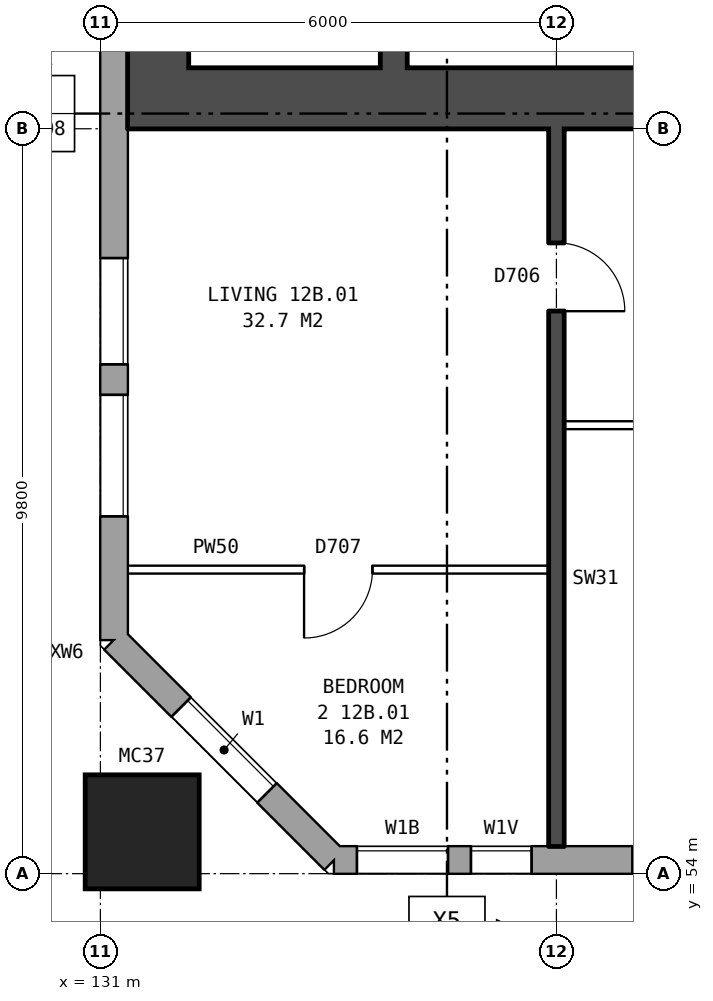
"""IFC4 building model, lengths in metres.
Left out: names, types, materials, properties, quantities, classifications, styles, units other than length and angle.
Written with IfcOpenShell. Run it as: python <this file> out.ifc"""

import sys

from ifc_helpers import new_model, si_unit, direction, frame, frame_2d, origin, origin_2d, place, context, subcontext, project, spatial, rectangle, hollow_rectangle, extrude, element, fill, save


model = new_model("IFC4")
c1 = context("Model", 3, precision=1e-05, world=origin(), true_north=direction((0.0, 1.0)))
c2 = subcontext(c1, "Body", "Model", "MODEL_VIEW")
j1 = project(units=[si_unit("LENGTHUNIT", "METRE"), si_unit("PLANEANGLEUNIT", "RADIAN")], contexts=[c1])
p1 = place(None, origin())
s1 = spatial("IfcSite", under=j1, at=p1, CompositionType="ELEMENT")
p2 = place(p1, origin())
s2 = spatial("IfcBuilding", under=s1, at=p2, CompositionType="ELEMENT")
p3 = place(p2, frame((0.0, 0.0, 47.4)))
s3 = spatial("IfcBuildingStorey", under=s2, at=p3, CompositionType="ELEMENT", Elevation=47.4)
p4 = place(p3, frame((131.55, 54.55, 0.0), z_axis=(0.0, 0.0, 1.0), x_axis=(1.0, 0.0, 0.0)))
e1 = element("IfcColumn", 1, at=p4, inside=s3, PredefinedType="COLUMN", context=c2, shape_type="SweptSolid", body=[
    extrude(hollow_rectangle(XDim=1.5, YDim=1.5, WallThickness=0.08, at=origin_2d()), origin(), (0.0, 0.0, 1.0), 3.1),
])
p5 = place(p3, frame((131.18, 57.075, 0.0), z_axis=(0.0, 0.0, 1.0), x_axis=(0.707106781187, -0.707106781187, 0.0)))
e2 = element("IfcWall", 2, at=p5, inside=s3, PredefinedType="STANDARD", context=c2, shape_type="SweptSolid", body=[
    extrude(rectangle(XDim=4.094, YDim=0.36, at=frame_2d((2.047, 0.0))), origin(), (0.0, 0.0, 1.0), 2.85),
])
p6 = place(p5, frame((1.247, 0.0, 0.8)))
e3 = element("IfcOpeningElement", 3, at=p6, cuts=e2, PredefinedType="OPENING", context=c2, shape_type="SweptSolid", body=[
    extrude(rectangle(XDim=1.6, YDim=1.8, at=frame_2d((0.8, 0.9))), frame((0.0, 0.19, 0.0), z_axis=(0.0, -1.0, 0.0), x_axis=(1.0, 0.0, 0.0)), (0.0, 0.0, 1.0), 0.38),
])
p7 = place(p3, frame((134.075, 54.18, 0.0), z_axis=(0.0, 0.0, 1.0), x_axis=(1.0, 0.0, 0.0)))
e4 = element("IfcWall", 4, at=p7, inside=s3, PredefinedType="STANDARD", context=c2, shape_type="SweptSolid", body=[
    extrude(rectangle(XDim=39.351, YDim=0.36, at=frame_2d((19.675, 0.0))), origin(), (0.0, 0.0, 1.0), 2.85),
])
p8 = place(p7, frame((0.3, 0.0, 0.8)))
e5 = element("IfcOpeningElement", 5, at=p8, cuts=e4, PredefinedType="OPENING", context=c2, shape_type="SweptSolid", body=[
    extrude(rectangle(XDim=1.2, YDim=1.8, at=frame_2d((0.6, 0.9))), frame((0.0, 0.19, 0.0), z_axis=(0.0, -1.0, 0.0), x_axis=(1.0, 0.0, 0.0)), (0.0, 0.0, 1.0), 0.38),
])
p9 = place(p7, frame((3.925, 0.0, 0.8)))
e6 = element("IfcOpeningElement", 6, at=p9, cuts=e4, PredefinedType="OPENING", context=c2, shape_type="SweptSolid", body=[
    extrude(rectangle(XDim=0.8, YDim=0.9, at=frame_2d((0.4, 0.45))), frame((0.0, 0.19, 0.0), z_axis=(0.0, -1.0, 0.0), x_axis=(1.0, 0.0, 0.0)), (0.0, 0.0, 1.0), 0.38),
])
p10 = place(p7, frame((6.625, 0.0, 0.8)))
e7 = element("IfcOpeningElement", 7, at=p10, cuts=e4, PredefinedType="OPENING", context=c2, shape_type="SweptSolid", body=[
    extrude(rectangle(XDim=1.6, YDim=1.8, at=frame_2d((0.8, 0.9))), frame((0.0, 0.19, 0.0), z_axis=(0.0, -1.0, 0.0), x_axis=(1.0, 0.0, 0.0)), (0.0, 0.0, 1.0), 0.38),
])
p11 = place(p7, frame((9.625, 0.0, 0.8)))
e8 = element("IfcOpeningElement", 8, at=p11, cuts=e4, PredefinedType="OPENING", context=c2, shape_type="SweptSolid", body=[
    extrude(rectangle(XDim=1.6, YDim=1.8, at=frame_2d((0.8, 0.9))), frame((0.0, 0.19, 0.0), z_axis=(0.0, -1.0, 0.0), x_axis=(1.0, 0.0, 0.0)), (0.0, 0.0, 1.0), 0.38),
])
p12 = place(p7, frame((12.625, 0.0, 0.8)))
e9 = element("IfcOpeningElement", 9, at=p12, cuts=e4, PredefinedType="OPENING", context=c2, shape_type="SweptSolid", body=[
    extrude(rectangle(XDim=1.6, YDim=1.8, at=frame_2d((0.8, 0.9))), frame((0.0, 0.19, 0.0), z_axis=(0.0, -1.0, 0.0), x_axis=(1.0, 0.0, 0.0)), (0.0, 0.0, 1.0), 0.38),
])
p13 = place(p7, frame((15.625, 0.0, 0.8)))
e10 = element("IfcOpeningElement", 10, at=p13, cuts=e4, PredefinedType="OPENING", context=c2, shape_type="SweptSolid", body=[
    extrude(rectangle(XDim=1.6, YDim=1.8, at=frame_2d((0.8, 0.9))), frame((0.0, 0.19, 0.0), z_axis=(0.0, -1.0, 0.0), x_axis=(1.0, 0.0, 0.0)), (0.0, 0.0, 1.0), 0.38),
])
p14 = place(p7, frame((18.625, 0.0, 0.8)))
e11 = element("IfcOpeningElement", 11, at=p14, cuts=e4, PredefinedType="OPENING", context=c2, shape_type="SweptSolid", body=[
    extrude(rectangle(XDim=1.6, YDim=1.8, at=frame_2d((0.8, 0.9))), frame((0.0, 0.19, 0.0), z_axis=(0.0, -1.0, 0.0), x_axis=(1.0, 0.0, 0.0)), (0.0, 0.0, 1.0), 0.38),
])
p15 = place(p7, frame((21.625, 0.0, 0.8)))
e12 = element("IfcOpeningElement", 12, at=p15, cuts=e4, PredefinedType="OPENING", context=c2, shape_type="SweptSolid", body=[
    extrude(rectangle(XDim=1.6, YDim=1.8, at=frame_2d((0.8, 0.9))), frame((0.0, 0.19, 0.0), z_axis=(0.0, -1.0, 0.0), x_axis=(1.0, 0.0, 0.0)), (0.0, 0.0, 1.0), 0.38),
])
p16 = place(p7, frame((24.625, 0.0, 0.8)))
e13 = element("IfcOpeningElement", 13, at=p16, cuts=e4, PredefinedType="OPENING", context=c2, shape_type="SweptSolid", body=[
    extrude(rectangle(XDim=1.6, YDim=1.8, at=frame_2d((0.8, 0.9))), frame((0.0, 0.19, 0.0), z_axis=(0.0, -1.0, 0.0), x_axis=(1.0, 0.0, 0.0)), (0.0, 0.0, 1.0), 0.38),
])
p17 = place(p7, frame((27.625, 0.0, 0.8)))
e14 = element("IfcOpeningElement", 14, at=p17, cuts=e4, PredefinedType="OPENING", context=c2, shape_type="SweptSolid", body=[
    extrude(rectangle(XDim=1.6, YDim=1.8, at=frame_2d((0.8, 0.9))), frame((0.0, 0.19, 0.0), z_axis=(0.0, -1.0, 0.0), x_axis=(1.0, 0.0, 0.0)), (0.0, 0.0, 1.0), 0.38),
])
p18 = place(p7, frame((30.625, 0.0, 0.8)))
e15 = element("IfcOpeningElement", 15, at=p18, cuts=e4, PredefinedType="OPENING", context=c2, shape_type="SweptSolid", body=[
    extrude(rectangle(XDim=1.6, YDim=1.8, at=frame_2d((0.8, 0.9))), frame((0.0, 0.19, 0.0), z_axis=(0.0, -1.0, 0.0), x_axis=(1.0, 0.0, 0.0)), (0.0, 0.0, 1.0), 0.38),
])
p19 = place(p7, frame((33.125, 0.0, 0.8)))
e16 = element("IfcOpeningElement", 16, at=p19, cuts=e4, PredefinedType="OPENING", context=c2, shape_type="SweptSolid", body=[
    extrude(rectangle(XDim=1.2, YDim=1.8, at=frame_2d((0.6, 0.9))), frame((0.0, 0.19, 0.0), z_axis=(0.0, -1.0, 0.0), x_axis=(1.0, 0.0, 0.0)), (0.0, 0.0, 1.0), 0.38),
])
p20 = place(p7, frame((34.625, 0.0, 0.8)))
e17 = element("IfcOpeningElement", 17, at=p20, cuts=e4, PredefinedType="OPENING", context=c2, shape_type="SweptSolid", body=[
    extrude(rectangle(XDim=0.8, YDim=0.9, at=frame_2d((0.4, 0.45))), frame((0.0, 0.19, 0.0), z_axis=(0.0, -1.0, 0.0), x_axis=(1.0, 0.0, 0.0)), (0.0, 0.0, 1.0), 0.38),
])
p21 = place(p7, frame((1.8, 0.0, 1.6)))
e18 = element("IfcOpeningElement", 18, at=p21, cuts=e4, PredefinedType="OPENING", context=c2, shape_type="SweptSolid", body=[
    extrude(rectangle(XDim=0.8, YDim=0.9, at=frame_2d((0.4, 0.45))), frame((0.0, 0.19, 0.0), z_axis=(0.0, -1.0, 0.0), x_axis=(1.0, 0.0, 0.0)), (0.0, 0.0, 1.0), 0.38),
])
p22 = place(p7, frame((5.025, 0.0, 0.8)))
e19 = element("IfcOpeningElement", 19, at=p22, cuts=e4, PredefinedType="OPENING", context=c2, shape_type="SweptSolid", body=[
    extrude(rectangle(XDim=1.2, YDim=1.8, at=frame_2d((0.6, 0.9))), frame((0.0, 0.19, 0.0), z_axis=(0.0, -1.0, 0.0), x_axis=(1.0, 0.0, 0.0)), (0.0, 0.0, 1.0), 0.38),
])
p23 = place(p7, frame((36.625, 0.0, 1.7)))
e20 = element("IfcOpeningElement", 20, at=p23, cuts=e4, PredefinedType="OPENING", context=c2, shape_type="SweptSolid", body=[
    extrude(rectangle(XDim=0.8, YDim=0.9, at=frame_2d((0.4, 0.45))), frame((0.0, 0.19, 0.0), z_axis=(0.0, -1.0, 0.0), x_axis=(1.0, 0.0, 0.0)), (0.0, 0.0, 1.0), 0.38),
])
p24 = place(p7, frame((37.725, 0.0, 0.8)))
e21 = element("IfcOpeningElement", 21, at=p24, cuts=e4, PredefinedType="OPENING", context=c2, shape_type="SweptSolid", body=[
    extrude(rectangle(XDim=1.0, YDim=1.8, at=frame_2d((0.5, 0.9))), frame((0.0, 0.19, 0.0), z_axis=(0.0, -1.0, 0.0), x_axis=(1.0, 0.0, 0.0)), (0.0, 0.0, 1.0), 0.38),
])
p25 = place(p3, frame((131.18, 82.925, 0.0), z_axis=(0.0, 0.0, 1.0), x_axis=(0.0, -1.0, 0.0)))
e22 = element("IfcWall", 22, at=p25, inside=s3, PredefinedType="STANDARD", context=c2, shape_type="SweptSolid", body=[
    extrude(rectangle(XDim=25.851, YDim=0.36, at=frame_2d((12.925, 0.0))), origin(), (0.0, 0.0, 1.0), 2.85),
])
p26 = place(p25, frame((1.625, 0.0, 0.8)))
e23 = element("IfcOpeningElement", 23, at=p26, cuts=e22, PredefinedType="OPENING", context=c2, shape_type="SweptSolid", body=[
    extrude(rectangle(XDim=1.6, YDim=1.8, at=frame_2d((0.8, 0.9))), frame((0.0, 0.19, 0.0), z_axis=(0.0, -1.0, 0.0), x_axis=(1.0, 0.0, 0.0)), (0.0, 0.0, 1.0), 0.38),
])
p27 = place(p25, frame((3.525, 0.0, 1.7)))
e24 = element("IfcOpeningElement", 24, at=p27, cuts=e22, PredefinedType="OPENING", context=c2, shape_type="SweptSolid", body=[
    extrude(rectangle(XDim=1.4, YDim=0.9, at=frame_2d((0.7, 0.45))), frame((0.0, 0.19, 0.0), z_axis=(0.0, -1.0, 0.0), x_axis=(1.0, 0.0, 0.0)), (0.0, 0.0, 1.0), 0.38),
])
p28 = place(p25, frame((20.825, 0.0, 1.7)))
e25 = element("IfcOpeningElement", 25, at=p28, cuts=e22, PredefinedType="OPENING", context=c2, shape_type="SweptSolid", body=[
    extrude(rectangle(XDim=1.4, YDim=0.9, at=frame_2d((0.7, 0.45))), frame((0.0, 0.19, 0.0), z_axis=(0.0, -1.0, 0.0), x_axis=(1.0, 0.0, 0.0)), (0.0, 0.0, 1.0), 0.38),
])
p29 = place(p25, frame((22.625, 0.0, 0.8)))
e26 = element("IfcOpeningElement", 26, at=p29, cuts=e22, PredefinedType="OPENING", context=c2, shape_type="SweptSolid", body=[
    extrude(rectangle(XDim=1.6, YDim=1.8, at=frame_2d((0.8, 0.9))), frame((0.0, 0.19, 0.0), z_axis=(0.0, -1.0, 0.0), x_axis=(1.0, 0.0, 0.0)), (0.0, 0.0, 1.0), 0.38),
])
p30 = place(p3, frame((131.76, 64.6, 0.0), z_axis=(0.0, 0.0, 1.0), x_axis=(0.0, 1.0, 0.0)))
e27 = element("IfcWall", 27, at=p30, inside=s3, PredefinedType="SHEAR", context=c2, shape_type="SweptSolid", body=[
    extrude(rectangle(XDim=10.8, YDim=0.8, at=frame_2d((5.4, 0.0))), origin(), (0.0, 0.0, 1.0), 2.85),
])
p31 = place(p3, frame((139.76, 64.2, 0.0), z_axis=(0.0, 0.0, 1.0), x_axis=(-1.0, 0.0, 0.0)))
e28 = element("IfcWall", 28, at=p31, inside=s3, PredefinedType="SHEAR", context=c2, shape_type="SweptSolid", body=[
    extrude(rectangle(XDim=8.4, YDim=0.8, at=frame_2d((4.2, 0.0))), origin(), (0.0, 0.0, 1.0), 2.85),
])
p32 = place(p3, frame((134.86, 64.6, 0.0), z_axis=(0.0, 0.0, 1.0), x_axis=(0.0, 1.0, 0.0)))
e29 = element("IfcWall", 29, at=p32, inside=s3, PredefinedType="SHEAR", context=c2, shape_type="SweptSolid", body=[
    extrude(rectangle(XDim=6.475, YDim=0.35, at=frame_2d((3.237, 0.0))), origin(), (0.0, 0.0, 1.0), 2.85),
])
p33 = place(p3, frame((131.36, 58.0, 0.0), z_axis=(0.0, 0.0, 1.0), x_axis=(1.0, 0.0, 0.0)))
e30 = element("IfcWall", 30, at=p33, inside=s3, PredefinedType="PARTITIONING", context=c2, shape_type="SweptSolid", body=[
    extrude(rectangle(XDim=5.54, YDim=0.1, at=frame_2d((2.77, 0.0))), origin(), (0.0, 0.0, 1.0), 2.85),
])
p34 = place(p33, frame((2.32, 0.0, 0.0)))
e31 = element("IfcOpeningElement", 31, at=p34, cuts=e30, PredefinedType="OPENING", context=c2, shape_type="SweptSolid", body=[
    extrude(rectangle(XDim=0.9, YDim=2.1, at=frame_2d((0.45, 1.05))), frame((0.0, 0.06, 0.0), z_axis=(0.0, -1.0, 0.0), x_axis=(1.0, 0.0, 0.0)), (0.0, 0.0, 1.0), 0.12),
])
p35 = place(p3, frame((137.1, 59.9, 0.0), z_axis=(0.0, 0.0, 1.0), x_axis=(1.0, 0.0, 0.0)))
e32 = element("IfcWall", 32, at=p35, inside=s3, PredefinedType="PARTITIONING", context=c2, shape_type="SweptSolid", body=[
    extrude(rectangle(XDim=5.8, YDim=0.1, at=frame_2d((2.9, 0.0))), origin(), (0.0, 0.0, 1.0), 2.85),
])
p36 = place(p35, frame((1.3, 0.0, 0.0)))
e33 = element("IfcOpeningElement", 33, at=p36, cuts=e32, PredefinedType="OPENING", context=c2, shape_type="SweptSolid", body=[
    extrude(rectangle(XDim=0.9, YDim=2.1, at=frame_2d((0.45, 1.05))), frame((0.0, 0.06, 0.0), z_axis=(0.0, -1.0, 0.0), x_axis=(1.0, 0.0, 0.0)), (0.0, 0.0, 1.0), 0.12),
])
p37 = place(p35, frame((4.2, 0.0, 0.0)))
e34 = element("IfcOpeningElement", 34, at=p37, cuts=e32, PredefinedType="OPENING", context=c2, shape_type="SweptSolid", body=[
    extrude(rectangle(XDim=0.9, YDim=2.1, at=frame_2d((0.45, 1.05))), frame((0.0, 0.06, 0.0), z_axis=(0.0, -1.0, 0.0), x_axis=(1.0, 0.0, 0.0)), (0.0, 0.0, 1.0), 0.12),
])
p38 = place(p3, frame((137.0, 54.36, 0.0), z_axis=(0.0, 0.0, 1.0), x_axis=(0.0, 1.0, 0.0)))
e35 = element("IfcWall", 35, at=p38, inside=s3, PredefinedType="SOLIDWALL", context=c2, shape_type="SweptSolid", body=[
    extrude(rectangle(XDim=9.44, YDim=0.2, at=frame_2d((4.72, 0.0))), origin(), (0.0, 0.0, 1.0), 2.85),
])
p39 = place(p38, frame((7.04, 0.0, 0.0)))
e36 = element("IfcOpeningElement", 36, at=p39, cuts=e35, PredefinedType="OPENING", context=c2, shape_type="SweptSolid", body=[
    extrude(rectangle(XDim=0.9, YDim=2.1, at=frame_2d((0.45, 1.05))), frame((0.0, 0.11, 0.0), z_axis=(0.0, -1.0, 0.0), x_axis=(1.0, 0.0, 0.0)), (0.0, 0.0, 1.0), 0.22),
])
p40 = place(p6, origin())
e37 = element("IfcWindow", 37, at=p40, inside=s3, PartitioningType="SINGLE_PANEL", PredefinedType="WINDOW", context=c2, shape_type="SweptSolid", body=[
    extrude(rectangle(XDim=1.6, YDim=1.8, at=frame_2d((0.8, 0.9))), frame((0.0, 0.15, 0.0), z_axis=(0.0, -1.0, 0.0), x_axis=(1.0, 0.0, 0.0)), (0.0, 0.0, 1.0), 0.06),
])
fill(e3, e37)
p41 = place(p8, origin())
e38 = element("IfcWindow", 38, at=p41, inside=s3, PartitioningType="SINGLE_PANEL", PredefinedType="WINDOW", context=c2, shape_type="SweptSolid", body=[
    extrude(rectangle(XDim=1.2, YDim=1.8, at=frame_2d((0.6, 0.9))), frame((0.0, 0.15, 0.0), z_axis=(0.0, -1.0, 0.0), x_axis=(1.0, 0.0, 0.0)), (0.0, 0.0, 1.0), 0.06),
])
fill(e5, e38)
p42 = place(p9, origin())
e39 = element("IfcWindow", 39, at=p42, inside=s3, PartitioningType="SINGLE_PANEL", PredefinedType="WINDOW", context=c2, shape_type="SweptSolid", body=[
    extrude(rectangle(XDim=0.8, YDim=0.9, at=frame_2d((0.4, 0.45))), frame((0.0, 0.15, 0.0), z_axis=(0.0, -1.0, 0.0), x_axis=(1.0, 0.0, 0.0)), (0.0, 0.0, 1.0), 0.06),
])
fill(e6, e39)
p43 = place(p28, origin())
e40 = element("IfcWindow", 40, at=p43, inside=s3, PartitioningType="SINGLE_PANEL", PredefinedType="WINDOW", context=c2, shape_type="SweptSolid", body=[
    extrude(rectangle(XDim=1.4, YDim=0.9, at=frame_2d((0.7, 0.45))), frame((0.0, 0.15, 0.0), z_axis=(0.0, -1.0, 0.0), x_axis=(1.0, 0.0, 0.0)), (0.0, 0.0, 1.0), 0.06),
])
fill(e25, e40)
p44 = place(p29, origin())
e41 = element("IfcWindow", 41, at=p44, inside=s3, PartitioningType="SINGLE_PANEL", PredefinedType="WINDOW", context=c2, shape_type="SweptSolid", body=[
    extrude(rectangle(XDim=1.6, YDim=1.8, at=frame_2d((0.8, 0.9))), frame((0.0, 0.15, 0.0), z_axis=(0.0, -1.0, 0.0), x_axis=(1.0, 0.0, 0.0)), (0.0, 0.0, 1.0), 0.06),
])
fill(e26, e41)
p45 = place(p34, frame((0.9, 0.0, 0.0), z_axis=(0.0, 0.0, 1.0), x_axis=(-1.0, 0.0, 0.0)))
e42 = element("IfcDoor", 42, at=p45, inside=s3, OperationType="SINGLE_SWING_RIGHT", PredefinedType="DOOR", context=c2, shape_type="SweptSolid", body=[
    extrude(rectangle(XDim=0.9, YDim=2.1, at=frame_2d((0.45, 1.05))), frame((0.0, 0.025, 0.0), z_axis=(0.0, -1.0, 0.0), x_axis=(1.0, 0.0, 0.0)), (0.0, 0.0, 1.0), 0.05),
])
fill(e31, e42)
p46 = place(p39, frame((0.9, 0.0, 0.0), z_axis=(0.0, 0.0, 1.0), x_axis=(-1.0, 0.0, 0.0)))
e43 = element("IfcDoor", 43, at=p46, inside=s3, OperationType="SINGLE_SWING_RIGHT", PredefinedType="DOOR", context=c2, shape_type="SweptSolid", body=[
    extrude(rectangle(XDim=0.9, YDim=2.1, at=frame_2d((0.45, 1.05))), frame((0.0, 0.025, 0.0), z_axis=(0.0, -1.0, 0.0), x_axis=(1.0, 0.0, 0.0)), (0.0, 0.0, 1.0), 0.05),
])
fill(e36, e43)
p47 = place(p21, origin())
e44 = element("IfcWindow", 44, at=p47, inside=s3, PartitioningType="SINGLE_PANEL", PredefinedType="WINDOW", context=c2, shape_type="SweptSolid", body=[
    extrude(rectangle(XDim=0.8, YDim=0.9, at=frame_2d((0.4, 0.45))), frame((0.0, 0.15, 0.0), z_axis=(0.0, -1.0, 0.0), x_axis=(1.0, 0.0, 0.0)), (0.0, 0.0, 1.0), 0.06),
])
fill(e18, e44)
save(model, sys.argv[1])
